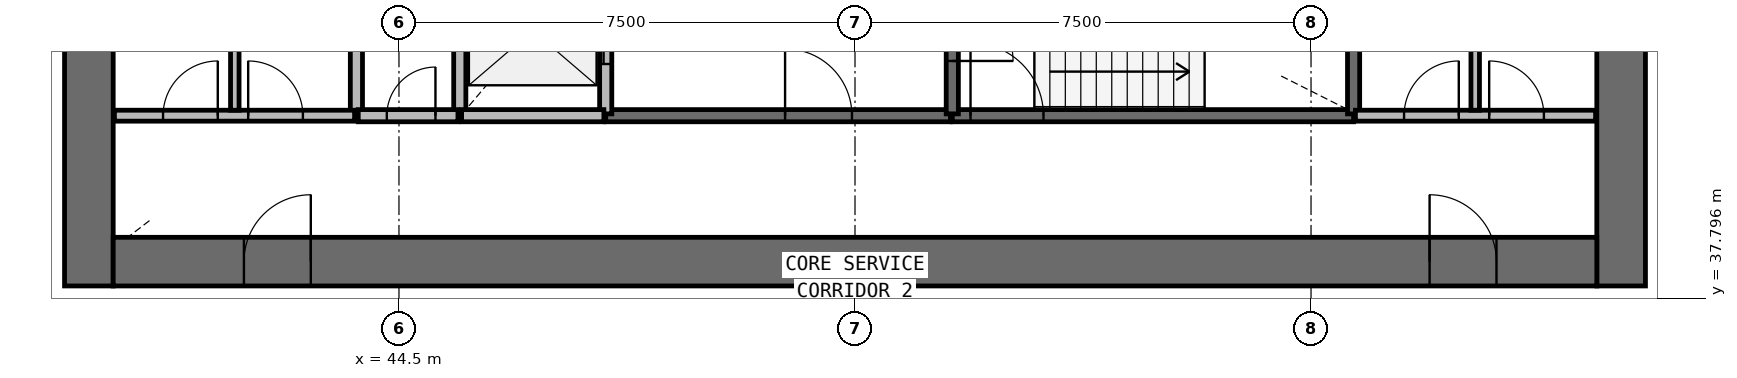
"""IFC4 building model, lengths in metres.
Left out: names, types, materials, properties, quantities, classifications, styles, units other than length and angle.
Written with IfcOpenShell. Run it as: python <this file> out.ifc"""

import sys

from ifc_helpers import new_model, si_unit, direction, frame, frame_2d, origin, place, context, subcontext, project, spatial, rectangle, extrude, source, transform, mapped, element, fill, save


model = new_model("IFC4")
c1 = context("Model", 3, precision=1e-05, world=origin(), true_north=direction((0.0, 1.0)))
c2 = subcontext(c1, "Body", "Model", "MODEL_VIEW")
j1 = project(units=[si_unit("LENGTHUNIT", "METRE"), si_unit("PLANEANGLEUNIT", "RADIAN")], contexts=[c1])
p1 = place(None, origin())
s1 = spatial("IfcSite", under=j1, at=p1, CompositionType="ELEMENT")
p2 = place(p1, origin())
s2 = spatial("IfcBuilding", under=s1, at=p2, CompositionType="ELEMENT")
p3 = place(p2, frame((0.0, 0.0, 137.0)))
s3 = spatial("IfcBuildingStorey", under=s2, at=p3, CompositionType="ELEMENT", Elevation=137.0)
p4 = place(p3, frame((64.6, 38.0, 0.0), z_axis=(0.0, 0.0, 1.0), x_axis=(0.0, 1.0, 0.0)))
e1 = element("IfcWall", 1, at=p4, inside=s3, PredefinedType="SHEAR", context=c2, shape_type="SweptSolid", body=[
    extrude(rectangle(XDim=20.0, YDim=0.8, at=frame_2d((10.0, 0.0))), origin(), (0.0, 0.0, 1.0), 3.9),
])
p5 = place(p4, frame((9.1, 0.0, 0.0)))
e2 = element("IfcOpeningElement", 2, at=p5, cuts=e1, PredefinedType="OPENING", context=c2, shape_type="SweptSolid", body=[
    extrude(rectangle(XDim=1.8, YDim=2.1, at=frame_2d((0.9, 1.05))), frame((0.0, 0.41, 0.0), z_axis=(0.0, -1.0, 0.0), x_axis=(1.0, 0.0, 0.0)), (0.0, 0.0, 1.0), 0.82),
])
p6 = place(p3, frame((39.4, 58.0, 0.0), z_axis=(0.0, 0.0, 1.0), x_axis=(0.0, -1.0, 0.0)))
e3 = element("IfcWall", 3, at=p6, inside=s3, PredefinedType="SHEAR", context=c2, shape_type="SweptSolid", body=[
    extrude(rectangle(XDim=20.0, YDim=0.8, at=frame_2d((10.0, 0.0))), origin(), (0.0, 0.0, 1.0), 3.9),
])
p7 = place(p6, frame((9.1, 0.0, 0.0)))
e4 = element("IfcOpeningElement", 4, at=p7, cuts=e3, PredefinedType="OPENING", context=c2, shape_type="SweptSolid", body=[
    extrude(rectangle(XDim=1.8, YDim=2.1, at=frame_2d((0.9, 1.05))), frame((0.0, 0.41, 0.0), z_axis=(0.0, -1.0, 0.0), x_axis=(1.0, 0.0, 0.0)), (0.0, 0.0, 1.0), 0.82),
])
p8 = place(p3, frame((39.8, 38.4, 0.0), z_axis=(0.0, 0.0, 1.0), x_axis=(1.0, 0.0, 0.0)))
e5 = element("IfcWall", 5, at=p8, inside=s3, PredefinedType="SHEAR", context=c2, shape_type="SweptSolid", body=[
    extrude(rectangle(XDim=24.4, YDim=0.8, at=frame_2d((12.2, 0.0))), origin(), (0.0, 0.0, 1.0), 3.9),
])
p9 = place(p8, frame((21.65, 0.0, 0.0)))
e6 = element("IfcOpeningElement", 6, at=p9, cuts=e5, PredefinedType="OPENING", context=c2, shape_type="SweptSolid", body=[
    extrude(rectangle(XDim=1.1, YDim=2.1, at=frame_2d((0.55, 1.05))), frame((0.0, 0.41, 0.0), z_axis=(0.0, -1.0, 0.0), x_axis=(1.0, 0.0, 0.0)), (0.0, 0.0, 1.0), 0.82),
])
p10 = place(p8, frame((2.15, 0.0, 0.0)))
e7 = element("IfcOpeningElement", 7, at=p10, cuts=e5, PredefinedType="OPENING", context=c2, shape_type="SweptSolid", body=[
    extrude(rectangle(XDim=1.1, YDim=2.1, at=frame_2d((0.55, 1.05))), frame((0.0, 0.41, 0.0), z_axis=(0.0, -1.0, 0.0), x_axis=(1.0, 0.0, 0.0)), (0.0, 0.0, 1.0), 0.82),
])
p11 = place(p3, frame((53.6, 40.8, 0.0), z_axis=(0.0, 0.0, 1.0), x_axis=(1.0, 0.0, 0.0)))
e8 = element("IfcWall", 8, at=p11, inside=s3, PredefinedType="SOLIDWALL", context=c2, shape_type="SweptSolid", body=[
    extrude(rectangle(XDim=6.6, YDim=0.2, at=frame_2d((3.3, 0.0))), origin(), (0.0, 0.0, 1.0), 3.58),
])
p12 = place(p11, frame((0.3, 0.0, 0.0)))
e9 = element("IfcOpeningElement", 9, at=p12, cuts=e8, PredefinedType="OPENING", context=c2, shape_type="SweptSolid", body=[
    extrude(rectangle(XDim=1.2, YDim=2.1, at=frame_2d((0.6, 1.05))), frame((0.0, 0.11, 0.0), z_axis=(0.0, -1.0, 0.0), x_axis=(1.0, 0.0, 0.0)), (0.0, 0.0, 1.0), 0.22),
])
p13 = place(p3, frame((47.9, 40.8, 0.0), z_axis=(0.0, 0.0, 1.0), x_axis=(1.0, 0.0, 0.0)))
e10 = element("IfcWall", 10, at=p13, inside=s3, PredefinedType="SOLIDWALL", context=c2, shape_type="SweptSolid", body=[
    extrude(rectangle(XDim=5.67, YDim=0.2, at=frame_2d((2.835, 0.0))), origin(), (0.0, 0.0, 1.0), 3.58),
])
p14 = place(p13, frame((2.95, 0.0, 0.0)))
e11 = element("IfcOpeningElement", 11, at=p14, cuts=e10, PredefinedType="OPENING", context=c2, shape_type="SweptSolid", body=[
    extrude(rectangle(XDim=1.1, YDim=2.1, at=frame_2d((0.55, 1.05))), frame((0.0, 0.11, 0.0), z_axis=(0.0, -1.0, 0.0), x_axis=(1.0, 0.0, 0.0)), (0.0, 0.0, 1.0), 0.22),
])
for number, where, z_axis, x_axis in (
    (12, (43.8, 43.6, 0.0), (0.0, 0.0, 1.0), (0.0, -1.0, 0.0)),
    (13, (45.5, 43.6, 0.0), (0.0, 0.0, 1.0), (0.0, -1.0, 0.0)),
):
    element("IfcWall", number, at=place(p3, frame(where, z_axis=z_axis, x_axis=x_axis)), inside=s3, PredefinedType="SOLIDWALL", context=c2, shape_type="SweptSolid", body=[
        extrude(rectangle(XDim=2.8, YDim=0.2, at=frame_2d((1.4, 0.0))), origin(), (0.0, 0.0, 1.0), 3.58),
    ])
p15 = place(p3, frame((47.9, 40.83, 0.0), z_axis=(0.0, 0.0, 1.0), x_axis=(0.0, 1.0, 0.0)))
e14 = element("IfcWall", 14, at=p15, inside=s3, PredefinedType="SOLIDWALL", context=c2, shape_type="SweptSolid", body=[
    extrude(rectangle(XDim=2.77, YDim=0.2, at=frame_2d((1.385, 0.0))), origin(), (0.0, 0.0, 1.0), 3.58),
])
p16 = place(p15, frame((0.82, 0.0, 0.0)))
e15 = element("IfcOpeningElement", 15, at=p16, cuts=e14, PredefinedType="OPENING", context=c2, shape_type="SweptSolid", body=[
    extrude(rectangle(XDim=1.1, YDim=2.1, at=frame_2d((0.55, 1.05))), frame((0.0, 0.11, 0.0), z_axis=(0.0, -1.0, 0.0), x_axis=(1.0, 0.0, 0.0)), (0.0, 0.0, 1.0), 0.22),
])
p17 = place(p3, frame((60.2, 40.83, 0.0), z_axis=(0.0, 0.0, 1.0), x_axis=(0.0, 1.0, 0.0)))
e16 = element("IfcWall", 16, at=p17, inside=s3, PredefinedType="SOLIDWALL", context=c2, shape_type="SweptSolid", body=[
    extrude(rectangle(XDim=2.77, YDim=0.2, at=frame_2d((1.385, 0.0))), origin(), (0.0, 0.0, 1.0), 3.58),
])
p18 = place(p3, frame((53.6, 43.6, 0.0), z_axis=(0.0, 0.0, 1.0), x_axis=(0.0, -1.0, 0.0)))
e17 = element("IfcWall", 17, at=p18, inside=s3, PredefinedType="SOLIDWALL", context=c2, shape_type="SweptSolid", body=[
    extrude(rectangle(XDim=2.77, YDim=0.2, at=frame_2d((1.385, 0.0))), origin(), (0.0, 0.0, 1.0), 3.58),
])
p19 = place(p18, frame((0.9, 0.0, 0.0)))
e18 = element("IfcOpeningElement", 18, at=p19, cuts=e17, PredefinedType="OPENING", context=c2, shape_type="SweptSolid", body=[
    extrude(rectangle(XDim=1.0, YDim=2.1, at=frame_2d((0.5, 1.05))), frame((0.0, 0.11, 0.0), z_axis=(0.0, -1.0, 0.0), x_axis=(1.0, 0.0, 0.0)), (0.0, 0.0, 1.0), 0.22),
])
p20 = place(p3, frame((45.53, 40.8, 0.0), z_axis=(0.0, 0.0, 1.0), x_axis=(1.0, 0.0, 0.0)))
e19 = element("IfcWall", 19, at=p20, inside=s3, PredefinedType="SOLIDWALL", context=c2, shape_type="SweptSolid", body=[
    extrude(rectangle(XDim=2.34, YDim=0.2, at=frame_2d((1.17, 0.0))), origin(), (0.0, 0.0, 1.0), 3.58),
])
p21 = place(p3, frame((43.83, 40.8, 0.0), z_axis=(0.0, 0.0, 1.0), x_axis=(1.0, 0.0, 0.0)))
e20 = element("IfcWall", 20, at=p21, inside=s3, PredefinedType="SOLIDWALL", context=c2, shape_type="SweptSolid", body=[
    extrude(rectangle(XDim=1.64, YDim=0.2, at=frame_2d((0.82, 0.0))), origin(), (0.0, 0.0, 1.0), 3.58),
])
p22 = place(p21, frame((0.47, 0.0, 0.0)))
e21 = element("IfcOpeningElement", 21, at=p22, cuts=e20, PredefinedType="OPENING", context=c2, shape_type="SweptSolid", body=[
    extrude(rectangle(XDim=0.8, YDim=2.1, at=frame_2d((0.4, 1.05))), frame((0.0, 0.11, 0.0), z_axis=(0.0, -1.0, 0.0), x_axis=(1.0, 0.0, 0.0)), (0.0, 0.0, 1.0), 0.22),
])
p23 = place(p3, frame((60.23, 40.8, 0.0), z_axis=(0.0, 0.0, 1.0), x_axis=(1.0, 0.0, 0.0)))
e22 = element("IfcWall", 22, at=p23, inside=s3, PredefinedType="PARTITIONING", context=c2, shape_type="SweptSolid", body=[
    extrude(rectangle(XDim=3.95, YDim=0.18, at=frame_2d((1.975, 0.0))), origin(), (0.0, 0.0, 1.0), 2.7),
])
p24 = place(p23, frame((0.8, 0.0, 0.0)))
e23 = element("IfcOpeningElement", 23, at=p24, cuts=e22, PredefinedType="OPENING", context=c2, shape_type="SweptSolid", body=[
    extrude(rectangle(XDim=0.9, YDim=2.1, at=frame_2d((0.45, 1.05))), frame((0.0, 0.1, 0.0), z_axis=(0.0, -1.0, 0.0), x_axis=(1.0, 0.0, 0.0)), (0.0, 0.0, 1.0), 0.2),
])
p25 = place(p23, frame((2.2, 0.0, 0.0)))
e24 = element("IfcOpeningElement", 24, at=p25, cuts=e22, PredefinedType="OPENING", context=c2, shape_type="SweptSolid", body=[
    extrude(rectangle(XDim=0.9, YDim=2.1, at=frame_2d((0.45, 1.05))), frame((0.0, 0.1, 0.0), z_axis=(0.0, -1.0, 0.0), x_axis=(1.0, 0.0, 0.0)), (0.0, 0.0, 1.0), 0.2),
])
p26 = place(p3, frame((39.82, 40.8, 0.0), z_axis=(0.0, 0.0, 1.0), x_axis=(1.0, 0.0, 0.0)))
e25 = element("IfcWall", 25, at=p26, inside=s3, PredefinedType="PARTITIONING", context=c2, shape_type="SweptSolid", body=[
    extrude(rectangle(XDim=3.95, YDim=0.18, at=frame_2d((1.975, 0.0))), origin(), (0.0, 0.0, 1.0), 2.7),
])
p27 = place(p26, frame((0.8, 0.0, 0.0)))
e26 = element("IfcOpeningElement", 26, at=p27, cuts=e25, PredefinedType="OPENING", context=c2, shape_type="SweptSolid", body=[
    extrude(rectangle(XDim=0.9, YDim=2.1, at=frame_2d((0.45, 1.05))), frame((0.0, 0.1, 0.0), z_axis=(0.0, -1.0, 0.0), x_axis=(1.0, 0.0, 0.0)), (0.0, 0.0, 1.0), 0.2),
])
p28 = place(p26, frame((2.2, 0.0, 0.0)))
e27 = element("IfcOpeningElement", 27, at=p28, cuts=e25, PredefinedType="OPENING", context=c2, shape_type="SweptSolid", body=[
    extrude(rectangle(XDim=0.9, YDim=2.1, at=frame_2d((0.45, 1.05))), frame((0.0, 0.1, 0.0), z_axis=(0.0, -1.0, 0.0), x_axis=(1.0, 0.0, 0.0)), (0.0, 0.0, 1.0), 0.2),
])
for number, where, z_axis, x_axis in (
    (28, (41.8, 40.89, 0.0), (0.0, 0.0, 1.0), (0.0, 1.0, 0.0)),
    (29, (62.2, 40.89, 0.0), (0.0, 0.0, 1.0), (0.0, 1.0, 0.0)),
):
    element("IfcWall", number, at=place(p3, frame(where, z_axis=z_axis, x_axis=x_axis)), inside=s3, PredefinedType="PARTITIONING", context=c2, shape_type="SweptSolid", body=[
        extrude(rectangle(XDim=2.71, YDim=0.14, at=frame_2d((1.355, 0.0))), origin(), (0.0, 0.0, 1.0), 2.88),
    ])
m1 = source(origin(), c2, "Body", "SweptSolid", [
    extrude(rectangle(XDim=1.1, YDim=2.1, at=frame_2d((0.55, 1.05))), frame((0.0, 0.025, 0.0), z_axis=(0.0, -1.0, 0.0), x_axis=(1.0, 0.0, 0.0)), (0.0, 0.0, 1.0), 0.05),
])
p29 = place(p16, origin())
e30 = element("IfcDoor", 30, at=p29, inside=s3, OperationType="DOUBLE_DOOR_SLIDING", PredefinedType="USERDEFINED", context=c2, shape_type="MappedRepresentation", body=[
    mapped(m1, transform((0.0, 0.0, 0.0), scale=1.0)),
])
fill(e15, e30)
m2 = source(origin(), c2, "Body", "SweptSolid", [
    extrude(rectangle(XDim=1.2, YDim=2.1, at=frame_2d((0.6, 1.05))), frame((0.0, 0.025, 0.0), z_axis=(0.0, -1.0, 0.0), x_axis=(1.0, 0.0, 0.0)), (0.0, 0.0, 1.0), 0.05),
])
p30 = place(p12, origin())
e31 = element("IfcDoor", 31, at=p30, inside=s3, OperationType="SINGLE_SWING_LEFT", PredefinedType="DOOR", context=c2, shape_type="MappedRepresentation", body=[
    mapped(m2, transform((0.0, 0.0, 0.0), scale=1.0)),
])
fill(e9, e31)
m3 = source(origin(), c2, "Body", "SweptSolid", [
    extrude(rectangle(XDim=1.0, YDim=2.1, at=frame_2d((0.5, 1.05))), frame((0.0, 0.025, 0.0), z_axis=(0.0, -1.0, 0.0), x_axis=(1.0, 0.0, 0.0)), (0.0, 0.0, 1.0), 0.05),
])
p31 = place(p19, origin())
e32 = element("IfcDoor", 32, at=p31, inside=s3, OperationType="SINGLE_SWING_RIGHT", PredefinedType="DOOR", context=c2, shape_type="MappedRepresentation", body=[
    mapped(m3, transform((0.0, 0.0, 0.0), scale=1.0)),
])
fill(e18, e32)
m4 = source(origin(), c2, "Body", "SweptSolid", [
    extrude(rectangle(XDim=1.1, YDim=2.1, at=frame_2d((0.55, 1.05))), frame((0.0, 0.025, 0.0), z_axis=(0.0, -1.0, 0.0), x_axis=(1.0, 0.0, 0.0)), (0.0, 0.0, 1.0), 0.05),
])
p32 = place(p14, origin())
e33 = element("IfcDoor", 33, at=p32, inside=s3, OperationType="SINGLE_SWING_LEFT", PredefinedType="DOOR", context=c2, shape_type="MappedRepresentation", body=[
    mapped(m4, transform((0.0, 0.0, 0.0), scale=1.0)),
])
fill(e11, e33)
m5 = source(origin(), c2, "Body", "SweptSolid", [
    extrude(rectangle(XDim=0.8, YDim=2.1, at=frame_2d((0.4, 1.05))), frame((0.0, 0.025, 0.0), z_axis=(0.0, -1.0, 0.0), x_axis=(1.0, 0.0, 0.0)), (0.0, 0.0, 1.0), 0.05),
])
p33 = place(p22, origin())
e34 = element("IfcDoor", 34, at=p33, inside=s3, OperationType="SINGLE_SWING_RIGHT", PredefinedType="DOOR", context=c2, shape_type="MappedRepresentation", body=[
    mapped(m5, transform((0.0, 0.0, 0.0), scale=1.0)),
])
fill(e21, e34)
m6 = source(origin(), c2, "Body", "SweptSolid", [
    extrude(rectangle(XDim=1.1, YDim=2.1, at=frame_2d((0.55, 1.05))), frame((0.0, 0.025, 0.0), z_axis=(0.0, -1.0, 0.0), x_axis=(1.0, 0.0, 0.0)), (0.0, 0.0, 1.0), 0.05),
])
p34 = place(p9, origin())
e35 = element("IfcDoor", 35, at=p34, inside=s3, OperationType="SINGLE_SWING_LEFT", PredefinedType="DOOR", context=c2, shape_type="MappedRepresentation", body=[
    mapped(m6, transform((0.0, 0.0, 0.0), scale=1.0)),
])
fill(e6, e35)
p35 = place(p10, origin())
e36 = element("IfcDoor", 36, at=p35, inside=s3, OperationType="SINGLE_SWING_RIGHT", PredefinedType="DOOR", context=c2, shape_type="MappedRepresentation", body=[
    mapped(m6, transform((0.0, 0.0, 0.0), scale=1.0)),
])
fill(e7, e36)
m7 = source(origin(), c2, "Body", "SweptSolid", [
    extrude(rectangle(XDim=0.9, YDim=2.1, at=frame_2d((0.45, 1.05))), frame((0.0, 0.025, 0.0), z_axis=(0.0, -1.0, 0.0), x_axis=(1.0, 0.0, 0.0)), (0.0, 0.0, 1.0), 0.05),
])
p36 = place(p27, origin())
e37 = element("IfcDoor", 37, at=p36, inside=s3, OperationType="SINGLE_SWING_RIGHT", PredefinedType="DOOR", context=c2, shape_type="MappedRepresentation", body=[
    mapped(m7, transform((0.0, 0.0, 0.0), scale=1.0)),
])
fill(e26, e37)
p37 = place(p28, origin())
e38 = element("IfcDoor", 38, at=p37, inside=s3, OperationType="SINGLE_SWING_LEFT", PredefinedType="DOOR", context=c2, shape_type="MappedRepresentation", body=[
    mapped(m7, transform((0.0, 0.0, 0.0), scale=1.0)),
])
fill(e27, e38)
p38 = place(p24, origin())
e39 = element("IfcDoor", 39, at=p38, inside=s3, OperationType="SINGLE_SWING_RIGHT", PredefinedType="DOOR", context=c2, shape_type="MappedRepresentation", body=[
    mapped(m7, transform((0.0, 0.0, 0.0), scale=1.0)),
])
fill(e23, e39)
p39 = place(p25, origin())
e40 = element("IfcDoor", 40, at=p39, inside=s3, OperationType="SINGLE_SWING_LEFT", PredefinedType="DOOR", context=c2, shape_type="MappedRepresentation", body=[
    mapped(m7, transform((0.0, 0.0, 0.0), scale=1.0)),
])
fill(e24, e40)
save(model, sys.argv[1])
